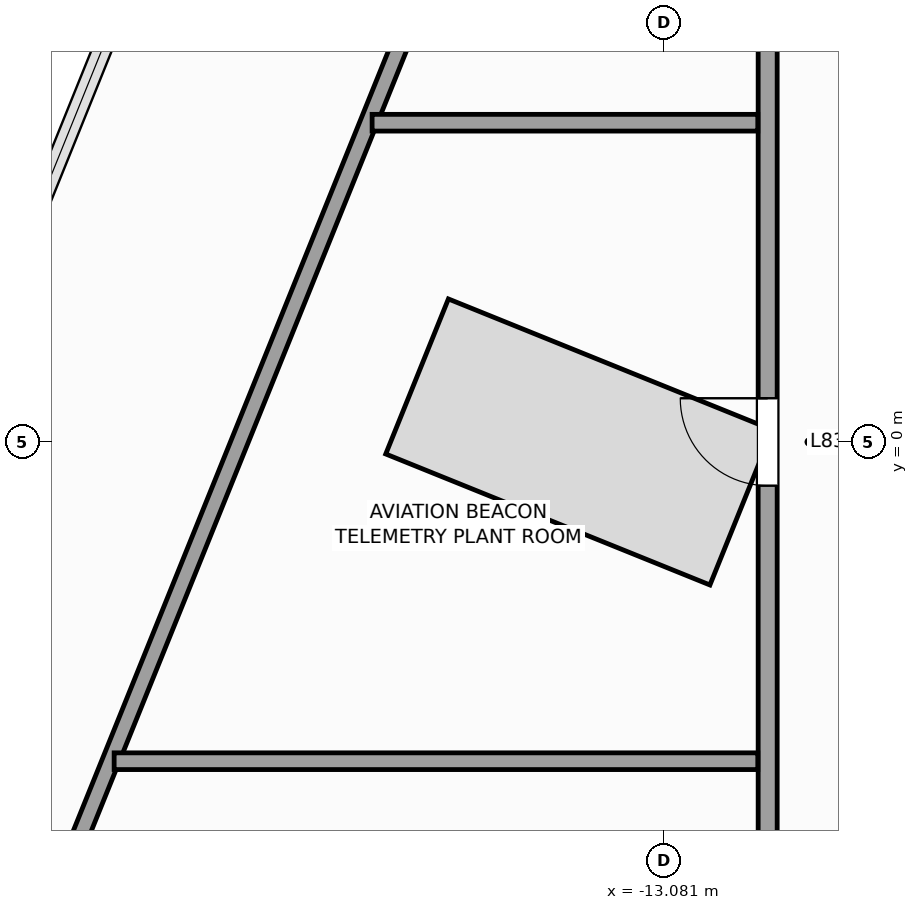
"""IFC4 building model, lengths in metres.
Left out: names, types, materials, properties, quantities, classifications, styles, units other than length and angle.
Written with IfcOpenShell. Run it as: python <this file> out.ifc"""

import sys

from ifc_helpers import new_model, si_unit, direction, frame, frame_2d, origin, place, context, subcontext, project, spatial, rectangle, extrude, source, transform, mapped, element, fill, save


model = new_model("IFC4")
c1 = context("Model", 3, precision=1e-05, world=origin(), true_north=direction((0.0, 1.0)))
c2 = subcontext(c1, "Body", "Model", "MODEL_VIEW")
j1 = project(units=[si_unit("LENGTHUNIT", "METRE"), si_unit("PLANEANGLEUNIT", "RADIAN")], contexts=[c1])
p1 = place(None, origin())
s1 = spatial("IfcSite", under=j1, at=p1, CompositionType="ELEMENT")
p2 = place(p1, origin())
s2 = spatial("IfcBuilding", under=s1, at=p2, CompositionType="ELEMENT")
p3 = place(p2, frame((0.0, 0.0, 337.6)))
s3 = spatial("IfcBuildingStorey", under=s2, at=p3, CompositionType="ELEMENT", Elevation=337.6)
p4 = place(p3, frame((-11.172, 18.556, 0.0), z_axis=(0.0, 0.0, 1.0), x_axis=(-0.374611707018, -0.927181788521, 0.0)))
e1 = element("IfcWall", 1, at=p4, inside=s3, PredefinedType="PARTITIONING", context=c2, shape_type="SweptSolid", body=[
    extrude(rectangle(XDim=26.04, YDim=0.22, at=frame_2d((13.02, 0.0))), origin(), (0.0, 0.0, 1.0), 3.05),
])
p5 = place(p3, frame((-11.72, -11.62, 0.0), z_axis=(0.0, 0.0, 1.0), x_axis=(0.0, 1.0, 0.0)))
e2 = element("IfcWall", 2, at=p5, inside=s3, PredefinedType="PARTITIONING", context=c2, shape_type="SweptSolid", body=[
    extrude(rectangle(XDim=21.84, YDim=0.25, at=frame_2d((10.92, 0.0))), origin(), (0.0, 0.0, 1.0), 3.7),
])
p6 = place(p5, frame((11.045, 0.0, 0.0)))
e3 = element("IfcOpeningElement", 3, at=p6, cuts=e2, PredefinedType="OPENING", context=c2, shape_type="SweptSolid", body=[
    extrude(rectangle(XDim=1.15, YDim=2.25, at=frame_2d((0.575, 1.125))), frame((0.0, 0.135, 0.0), z_axis=(0.0, -1.0, 0.0), x_axis=(1.0, 0.0, 0.0)), (0.0, 0.0, 1.0), 0.27),
])
p7 = place(p3, frame((-11.85, 4.2, 0.0), z_axis=(0.0, 0.0, 1.0), x_axis=(-1.0, 0.0, 0.0)))
e4 = element("IfcWall", 4, at=p7, inside=s3, PredefinedType="PARTITIONING", context=c2, shape_type="SweptSolid", body=[
    extrude(rectangle(XDim=5.074, YDim=0.22, at=frame_2d((2.537, 0.0))), origin(), (0.0, 0.0, 1.0), 3.7),
])
p8 = place(p3, frame((-11.85, -4.2, 0.0), z_axis=(0.0, 0.0, 1.0), x_axis=(-1.0, 0.0, 0.0)))
e5 = element("IfcWall", 5, at=p8, inside=s3, PredefinedType="PARTITIONING", context=c2, shape_type="SweptSolid", body=[
    extrude(rectangle(XDim=8.468, YDim=0.22, at=frame_2d((4.234, 0.0))), origin(), (0.0, 0.0, 1.0), 3.7),
])
m1 = source(origin(), c2, "Body", "SweptSolid", [
    extrude(rectangle(XDim=1.15, YDim=2.25, at=frame_2d((0.575, 1.125))), frame((0.0, 0.025, 0.0), z_axis=(0.0, -1.0, 0.0), x_axis=(1.0, 0.0, 0.0)), (0.0, 0.0, 1.0), 0.05),
])
p9 = place(p6, origin())
e6 = element("IfcDoor", 6, at=p9, inside=s3, OperationType="SINGLE_SWING_RIGHT", PredefinedType="DOOR", context=c2, shape_type="MappedRepresentation", body=[
    mapped(m1, transform((0.0, 0.0, 0.0), scale=1.0)),
])
fill(e3, e6)
save(model, sys.argv[1])
